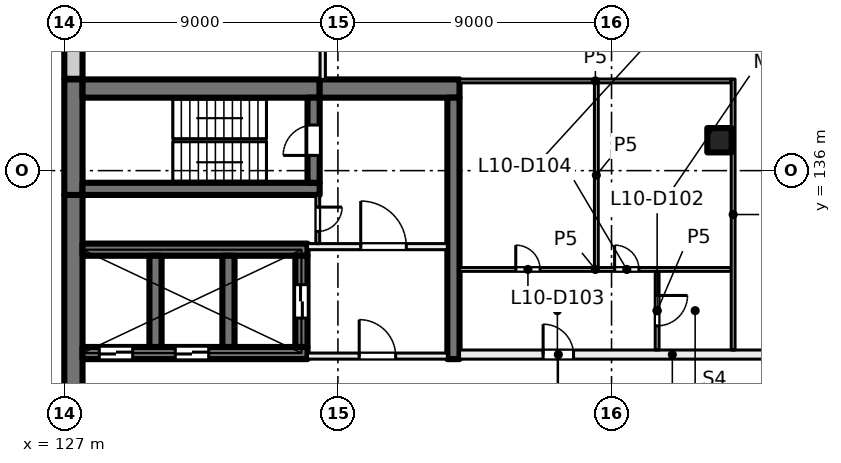
"""IFC4 building model, lengths in metres.
Left out: names, types, materials, properties, quantities, classifications, styles, units other than length and angle.
Written with IfcOpenShell. Run it as: python <this file> out.ifc"""

import sys

from ifc_helpers import new_model, si_unit, direction, frame, frame_2d, origin, origin_2d, place, context, subcontext, project, spatial, rectangle, extrude, element, fill, save


model = new_model("IFC4")
c1 = context("Model", 3, precision=1e-05, world=origin(), true_north=direction((0.0, 1.0)))
c2 = subcontext(c1, "Body", "Model", "MODEL_VIEW")
j1 = project(units=[si_unit("LENGTHUNIT", "METRE"), si_unit("PLANEANGLEUNIT", "RADIAN")], contexts=[c1])
p1 = place(None, origin())
s1 = spatial("IfcSite", under=j1, at=p1, CompositionType="ELEMENT")
p2 = place(p1, origin())
s2 = spatial("IfcBuilding", under=s1, at=p2, CompositionType="ELEMENT")
p3 = place(p2, frame((0.0, 0.0, 47.5)))
s3 = spatial("IfcBuildingStorey", under=s2, at=p3, CompositionType="ELEMENT", Elevation=47.5)
p4 = place(p3, frame((148.55, 137.0, 0.0), z_axis=(0.0, 0.0, 1.0), x_axis=(1.0, 0.0, 0.0)))
e1 = element("IfcColumn", 1, at=p4, inside=s3, PredefinedType="COLUMN", context=c2, shape_type="SweptSolid", body=[
    extrude(rectangle(XDim=0.8, YDim=0.8, at=origin_2d()), origin(), (0.0, 0.0, 1.0), 4.0),
])
p5 = place(p3, frame((127.3, 120.8, 0.0), z_axis=(0.0, 0.0, 1.0), x_axis=(0.0, 1.0, 0.0)))
e2 = element("IfcWall", 2, at=p5, inside=s3, PredefinedType="SHEAR", context=c2, shape_type="SweptSolid", body=[
    extrude(rectangle(XDim=14.4, YDim=0.6, at=frame_2d((7.2, 0.0))), origin(), (0.0, 0.0, 1.0), 4.0),
])
p6 = place(p3, frame((127.3, 135.2, 0.0), z_axis=(0.0, 0.0, 1.0), x_axis=(0.0, 1.0, 0.0)))
e3 = element("IfcWall", 3, at=p6, inside=s3, PredefinedType="SHEAR", context=c2, shape_type="SweptSolid", body=[
    extrude(rectangle(XDim=3.8, YDim=0.6, at=frame_2d((1.9, 0.0))), origin(), (0.0, 0.0, 1.0), 4.0),
])
p7 = place(p3, frame((127.6, 138.7, 0.0), z_axis=(0.0, 0.0, 1.0), x_axis=(1.0, 0.0, 0.0)))
e4 = element("IfcWall", 4, at=p7, inside=s3, PredefinedType="SHEAR", context=c2, shape_type="SweptSolid", body=[
    extrude(rectangle(XDim=7.8, YDim=0.6, at=frame_2d((3.9, 0.0))), origin(), (0.0, 0.0, 1.0), 4.0),
])
p8 = place(p3, frame((135.4, 138.7, 0.0), z_axis=(0.0, 0.0, 1.0), x_axis=(1.0, 0.0, 0.0)))
e5 = element("IfcWall", 5, at=p8, inside=s3, PredefinedType="SHEAR", context=c2, shape_type="SweptSolid", body=[
    extrude(rectangle(XDim=4.6, YDim=0.6, at=frame_2d((2.3, 0.0))), origin(), (0.0, 0.0, 1.0), 4.0),
])
p9 = place(p3, frame((127.6, 135.4, 0.0), z_axis=(0.0, 0.0, 1.0), x_axis=(1.0, 0.0, 0.0)))
e6 = element("IfcWall", 6, at=p9, inside=s3, PredefinedType="SHEAR", context=c2, shape_type="SweptSolid", body=[
    extrude(rectangle(XDim=7.8, YDim=0.4, at=frame_2d((3.9, 0.0))), origin(), (0.0, 0.0, 1.0), 4.0),
])
p10 = place(p3, frame((135.2, 135.6, 0.0), z_axis=(0.0, 0.0, 1.0), x_axis=(0.0, 1.0, 0.0)))
e7 = element("IfcWall", 7, at=p10, inside=s3, PredefinedType="SHEAR", context=c2, shape_type="SweptSolid", body=[
    extrude(rectangle(XDim=2.8, YDim=0.4, at=frame_2d((1.4, 0.0))), origin(), (0.0, 0.0, 1.0), 4.0),
])
p11 = place(p10, frame((0.9, 0.0, 0.0)))
e8 = element("IfcOpeningElement", 8, at=p11, cuts=e7, PredefinedType="OPENING", context=c2, shape_type="SweptSolid", body=[
    extrude(rectangle(XDim=1.0, YDim=2.1, at=frame_2d((0.5, 1.05))), frame((0.0, 0.21, 0.0), z_axis=(0.0, -1.0, 0.0), x_axis=(1.0, 0.0, 0.0)), (0.0, 0.0, 1.0), 0.42),
])
p12 = place(p3, frame((127.6, 130.0, 0.0), z_axis=(0.0, 0.0, 1.0), x_axis=(1.0, 0.0, 0.0)))
e9 = element("IfcWall", 9, at=p12, inside=s3, PredefinedType="SHEAR", context=c2, shape_type="SweptSolid", body=[
    extrude(rectangle(XDim=7.4, YDim=0.4, at=frame_2d((3.7, 0.0))), origin(), (0.0, 0.0, 1.0), 4.0),
])
p13 = place(p12, frame((0.55, 0.0, 0.0)))
e10 = element("IfcOpeningElement", 10, at=p13, cuts=e9, PredefinedType="OPENING", context=c2, shape_type="SweptSolid", body=[
    extrude(rectangle(XDim=1.1, YDim=2.1, at=frame_2d((0.55, 1.05))), frame((0.0, 0.21, 0.0), z_axis=(0.0, -1.0, 0.0), x_axis=(1.0, 0.0, 0.0)), (0.0, 0.0, 1.0), 0.42),
])
p14 = place(p12, frame((3.05, 0.0, 0.0)))
e11 = element("IfcOpeningElement", 11, at=p14, cuts=e9, PredefinedType="OPENING", context=c2, shape_type="SweptSolid", body=[
    extrude(rectangle(XDim=1.1, YDim=2.1, at=frame_2d((0.55, 1.05))), frame((0.0, 0.21, 0.0), z_axis=(0.0, -1.0, 0.0), x_axis=(1.0, 0.0, 0.0)), (0.0, 0.0, 1.0), 0.42),
])
p15 = place(p3, frame((127.6, 133.4, 0.0), z_axis=(0.0, 0.0, 1.0), x_axis=(1.0, 0.0, 0.0)))
e12 = element("IfcWall", 12, at=p15, inside=s3, PredefinedType="SHEAR", context=c2, shape_type="SweptSolid", body=[
    extrude(rectangle(XDim=7.4, YDim=0.4, at=frame_2d((3.7, 0.0))), origin(), (0.0, 0.0, 1.0), 4.0),
])
for number, where, z_axis, x_axis in (
    (13, (130.0, 130.2, 0.0), (0.0, 0.0, 1.0), (0.0, 1.0, 0.0)),
    (14, (132.4, 130.2, 0.0), (0.0, 0.0, 1.0), (0.0, 1.0, 0.0)),
):
    element("IfcWall", number, at=place(p3, frame(where, z_axis=z_axis, x_axis=x_axis)), inside=s3, PredefinedType="SHEAR", context=c2, shape_type="SweptSolid", body=[
        extrude(rectangle(XDim=3.0, YDim=0.4, at=frame_2d((1.5, 0.0))), origin(), (0.0, 0.0, 1.0), 4.0),
    ])
p16 = place(p3, frame((134.8, 130.2, 0.0), z_axis=(0.0, 0.0, 1.0), x_axis=(0.0, 1.0, 0.0)))
e15 = element("IfcWall", 15, at=p16, inside=s3, PredefinedType="SHEAR", context=c2, shape_type="SweptSolid", body=[
    extrude(rectangle(XDim=3.0, YDim=0.4, at=frame_2d((1.5, 0.0))), origin(), (0.0, 0.0, 1.0), 4.0),
])
p17 = place(p16, frame((0.95, 0.0, 0.0)))
e16 = element("IfcOpeningElement", 16, at=p17, cuts=e15, PredefinedType="OPENING", context=c2, shape_type="SweptSolid", body=[
    extrude(rectangle(XDim=1.1, YDim=2.1, at=frame_2d((0.55, 1.05))), frame((0.0, 0.21, 0.0), z_axis=(0.0, -1.0, 0.0), x_axis=(1.0, 0.0, 0.0)), (0.0, 0.0, 1.0), 0.42),
])
p18 = place(p3, frame((139.8, 129.8, 0.0), z_axis=(0.0, 0.0, 1.0), x_axis=(0.0, 1.0, 0.0)))
e17 = element("IfcWall", 17, at=p18, inside=s3, PredefinedType="SHEAR", context=c2, shape_type="SweptSolid", body=[
    extrude(rectangle(XDim=8.6, YDim=0.4, at=frame_2d((4.3, 0.0))), origin(), (0.0, 0.0, 1.0), 4.0),
])
p19 = place(p3, frame((127.3, 139.02, 0.0), z_axis=(0.0, 0.0, 1.0), x_axis=(0.0, 1.0, 0.0)))
e18 = element("IfcWall", 18, at=p19, inside=s3, PredefinedType="SOLIDWALL", context=c2, shape_type="SweptSolid", body=[
    extrude(rectangle(XDim=2.98, YDim=0.6, at=frame_2d((1.49, 0.0))), origin(), (0.0, 0.0, 1.0), 3.625),
])
p20 = place(p3, frame((135.0, 129.9, 0.0), z_axis=(0.0, 0.0, 1.0), x_axis=(1.0, 0.0, 0.0)))
e19 = element("IfcWall", 19, at=p20, inside=s3, PredefinedType="PARTITIONING", context=c2, shape_type="SweptSolid", body=[
    extrude(rectangle(XDim=4.6, YDim=0.2, at=frame_2d((2.3, 0.0))), origin(), (0.0, 0.0, 1.0), 3.625),
])
p21 = place(p20, frame((1.7, 0.0, 0.0)))
e20 = element("IfcOpeningElement", 20, at=p21, cuts=e19, PredefinedType="OPENING", context=c2, shape_type="SweptSolid", body=[
    extrude(rectangle(XDim=1.2, YDim=2.1, at=frame_2d((0.6, 1.05))), frame((0.0, 0.11, 0.0), z_axis=(0.0, -1.0, 0.0), x_axis=(1.0, 0.0, 0.0)), (0.0, 0.0, 1.0), 0.22),
])
p22 = place(p3, frame((135.0, 133.5, 0.0), z_axis=(0.0, 0.0, 1.0), x_axis=(1.0, 0.0, 0.0)))
e21 = element("IfcWall", 21, at=p22, inside=s3, PredefinedType="PARTITIONING", context=c2, shape_type="SweptSolid", body=[
    extrude(rectangle(XDim=4.6, YDim=0.2, at=frame_2d((2.3, 0.0))), origin(), (0.0, 0.0, 1.0), 3.625),
])
p23 = place(p22, frame((1.75, 0.0, 0.0)))
e22 = element("IfcOpeningElement", 22, at=p23, cuts=e21, PredefinedType="OPENING", context=c2, shape_type="SweptSolid", body=[
    extrude(rectangle(XDim=1.5, YDim=2.1, at=frame_2d((0.75, 1.05))), frame((0.0, 0.11, 0.0), z_axis=(0.0, -1.0, 0.0), x_axis=(1.0, 0.0, 0.0)), (0.0, 0.0, 1.0), 0.22),
])
p24 = place(p3, frame((135.337, 135.2, 0.0), z_axis=(0.0, 0.0, 1.0), x_axis=(0.0, -1.0, 0.0)))
e23 = element("IfcWall", 23, at=p24, inside=s3, PredefinedType="PARTITIONING", context=c2, shape_type="SweptSolid", body=[
    extrude(rectangle(XDim=1.6, YDim=0.125, at=frame_2d((0.8, 0.0))), origin(), (0.0, 0.0, 1.0), 3.625),
])
p25 = place(p24, frame((0.4, 0.0, 0.0)))
e24 = element("IfcOpeningElement", 24, at=p25, cuts=e23, PredefinedType="OPENING", context=c2, shape_type="SweptSolid", body=[
    extrude(rectangle(XDim=0.8, YDim=2.1, at=frame_2d((0.4, 1.05))), frame((0.0, 0.073, 0.0), z_axis=(0.0, -1.0, 0.0), x_axis=(1.0, 0.0, 0.0)), (0.0, 0.0, 1.0), 0.145),
])
p26 = place(p3, frame((135.5, 145.4, 0.0), z_axis=(0.0, 0.0, 1.0), x_axis=(0.0, -1.0, 0.0)))
e25 = element("IfcWall", 25, at=p26, inside=s3, PredefinedType="PARTITIONING", context=c2, shape_type="SweptSolid", body=[
    extrude(rectangle(XDim=6.4, YDim=0.175, at=frame_2d((3.2, 0.0))), origin(), (0.0, 0.0, 1.0), 3.625),
])
p27 = place(p26, frame((2.6, 0.0, 0.0)))
e26 = element("IfcOpeningElement", 26, at=p27, cuts=e25, PredefinedType="OPENING", context=c2, shape_type="SweptSolid", body=[
    extrude(rectangle(XDim=1.2, YDim=2.1, at=frame_2d((0.6, 1.05))), frame((0.0, 0.097, 0.0), z_axis=(0.0, -1.0, 0.0), x_axis=(1.0, 0.0, 0.0)), (0.0, 0.0, 1.0), 0.195),
])
p28 = place(p3, frame((140.0, 129.95, 0.0), z_axis=(0.0, 0.0, 1.0), x_axis=(1.0, 0.0, 0.0)))
e27 = element("IfcWall", 27, at=p28, inside=s3, PredefinedType="PARTITIONING", context=c2, shape_type="SweptSolid", body=[
    extrude(rectangle(XDim=14.0, YDim=0.3, at=frame_2d((7.0, 0.0))), origin(), (0.0, 0.0, 1.0), 3.625),
])
p29 = place(p28, frame((2.75, 0.0, 0.0)))
e28 = element("IfcOpeningElement", 28, at=p29, cuts=e27, PredefinedType="OPENING", context=c2, shape_type="SweptSolid", body=[
    extrude(rectangle(XDim=1.0, YDim=2.1, at=frame_2d((0.5, 1.05))), frame((0.0, 0.16, 0.0), z_axis=(0.0, -1.0, 0.0), x_axis=(1.0, 0.0, 0.0)), (0.0, 0.0, 1.0), 0.32),
])
p30 = place(p28, frame((10.6, 0.0, 0.0)))
e29 = element("IfcOpeningElement", 29, at=p30, cuts=e27, PredefinedType="OPENING", context=c2, shape_type="SweptSolid", body=[
    extrude(rectangle(XDim=1.8, YDim=2.1, at=frame_2d((0.9, 1.05))), frame((0.0, 0.16, 0.0), z_axis=(0.0, -1.0, 0.0), x_axis=(1.0, 0.0, 0.0)), (0.0, 0.0, 1.0), 0.32),
])
p31 = place(p3, frame((140.0, 132.75, 0.0), z_axis=(0.0, 0.0, 1.0), x_axis=(1.0, 0.0, 0.0)))
e30 = element("IfcWall", 30, at=p31, inside=s3, PredefinedType="PARTITIONING", context=c2, shape_type="SweptSolid", body=[
    extrude(rectangle(XDim=8.938, YDim=0.125, at=frame_2d((4.469, 0.0))), origin(), (0.0, 0.0, 1.0), 3.625),
])
p32 = place(p31, frame((1.85, 0.0, 0.0)))
e31 = element("IfcOpeningElement", 31, at=p32, cuts=e30, PredefinedType="OPENING", context=c2, shape_type="SweptSolid", body=[
    extrude(rectangle(XDim=0.8, YDim=2.1, at=frame_2d((0.4, 1.05))), frame((0.0, 0.073, 0.0), z_axis=(0.0, -1.0, 0.0), x_axis=(1.0, 0.0, 0.0)), (0.0, 0.0, 1.0), 0.145),
])
p33 = place(p31, frame((5.102, 0.0, 0.0)))
e32 = element("IfcOpeningElement", 32, at=p33, cuts=e30, PredefinedType="OPENING", context=c2, shape_type="SweptSolid", body=[
    extrude(rectangle(XDim=0.8, YDim=2.1, at=frame_2d((0.4, 1.05))), frame((0.0, 0.073, 0.0), z_axis=(0.0, -1.0, 0.0), x_axis=(1.0, 0.0, 0.0)), (0.0, 0.0, 1.0), 0.145),
])
p34 = place(p3, frame((140.0, 138.95, 0.0), z_axis=(0.0, 0.0, 1.0), x_axis=(1.0, 0.0, 0.0)))
e33 = element("IfcWall", 33, at=p34, inside=s3, PredefinedType="PARTITIONING", context=c2, shape_type="SweptSolid", body=[
    extrude(rectangle(XDim=8.938, YDim=0.125, at=frame_2d((4.469, 0.0))), origin(), (0.0, 0.0, 1.0), 3.625),
])
p35 = place(p3, frame((144.5, 132.812, 0.0), z_axis=(0.0, 0.0, 1.0), x_axis=(0.0, 1.0, 0.0)))
e34 = element("IfcWall", 34, at=p35, inside=s3, PredefinedType="PARTITIONING", context=c2, shape_type="SweptSolid", body=[
    extrude(rectangle(XDim=6.076, YDim=0.125, at=frame_2d((3.038, 0.0))), origin(), (0.0, 0.0, 1.0), 3.625),
])
p36 = place(p3, frame((146.5, 132.688, 0.0), z_axis=(0.0, 0.0, 1.0), x_axis=(0.0, -1.0, 0.0)))
e35 = element("IfcWall", 35, at=p36, inside=s3, PredefinedType="PARTITIONING", context=c2, shape_type="SweptSolid", body=[
    extrude(rectangle(XDim=2.588, YDim=0.125, at=frame_2d((1.294, 0.0))), origin(), (0.0, 0.0, 1.0), 3.625),
])
p37 = place(p36, frame((0.794, 0.0, 0.0)))
e36 = element("IfcOpeningElement", 36, at=p37, cuts=e35, PredefinedType="OPENING", context=c2, shape_type="SweptSolid", body=[
    extrude(rectangle(XDim=1.0, YDim=2.1, at=frame_2d((0.5, 1.05))), frame((0.0, 0.073, 0.0), z_axis=(0.0, -1.0, 0.0), x_axis=(1.0, 0.0, 0.0)), (0.0, 0.0, 1.0), 0.145),
])
p38 = place(p3, frame((149.0, 139.012, 0.0), z_axis=(0.0, 0.0, 1.0), x_axis=(0.0, -1.0, 0.0)))
e37 = element("IfcWall", 37, at=p38, inside=s3, PredefinedType="PARTITIONING", context=c2, shape_type="SweptSolid", body=[
    extrude(rectangle(XDim=8.912, YDim=0.125, at=frame_2d((4.456, 0.0))), origin(), (0.0, 0.0, 1.0), 3.625),
])
p39 = place(p13, origin())
e38 = element("IfcDoor", 38, at=p39, inside=s3, OperationType="DOUBLE_DOOR_SLIDING", PredefinedType="DOOR", context=c2, shape_type="SweptSolid", body=[
    extrude(rectangle(XDim=1.1, YDim=2.1, at=frame_2d((0.55, 1.05))), frame((0.0, 0.025, 0.0), z_axis=(0.0, -1.0, 0.0), x_axis=(1.0, 0.0, 0.0)), (0.0, 0.0, 1.0), 0.05),
])
fill(e10, e38)
p40 = place(p14, origin())
e39 = element("IfcDoor", 39, at=p40, inside=s3, OperationType="DOUBLE_DOOR_SLIDING", PredefinedType="DOOR", context=c2, shape_type="SweptSolid", body=[
    extrude(rectangle(XDim=1.1, YDim=2.1, at=frame_2d((0.55, 1.05))), frame((0.0, 0.025, 0.0), z_axis=(0.0, -1.0, 0.0), x_axis=(1.0, 0.0, 0.0)), (0.0, 0.0, 1.0), 0.05),
])
fill(e11, e39)
p41 = place(p21, origin())
e40 = element("IfcDoor", 40, at=p41, inside=s3, OperationType="DOUBLE_DOOR_SINGLE_SWING", PredefinedType="DOOR", context=c2, shape_type="SweptSolid", body=[
    extrude(rectangle(XDim=1.2, YDim=2.1, at=frame_2d((0.6, 1.05))), frame((0.0, 0.025, 0.0), z_axis=(0.0, -1.0, 0.0), x_axis=(1.0, 0.0, 0.0)), (0.0, 0.0, 1.0), 0.05),
])
fill(e20, e40)
p42 = place(p23, origin())
e41 = element("IfcDoor", 41, at=p42, inside=s3, OperationType="DOUBLE_DOOR_SINGLE_SWING", PredefinedType="DOOR", context=c2, shape_type="SweptSolid", body=[
    extrude(rectangle(XDim=1.5, YDim=2.1, at=frame_2d((0.75, 1.05))), frame((0.0, 0.025, 0.0), z_axis=(0.0, -1.0, 0.0), x_axis=(1.0, 0.0, 0.0)), (0.0, 0.0, 1.0), 0.05),
])
fill(e22, e41)
p43 = place(p11, origin())
e42 = element("IfcDoor", 42, at=p43, inside=s3, OperationType="SINGLE_SWING_LEFT", PredefinedType="DOOR", context=c2, shape_type="SweptSolid", body=[
    extrude(rectangle(XDim=1.0, YDim=2.1, at=frame_2d((0.5, 1.05))), frame((0.0, 0.025, 0.0), z_axis=(0.0, -1.0, 0.0), x_axis=(1.0, 0.0, 0.0)), (0.0, 0.0, 1.0), 0.05),
])
fill(e8, e42)
p44 = place(p25, origin())
e43 = element("IfcDoor", 43, at=p44, inside=s3, OperationType="SINGLE_SWING_RIGHT", PredefinedType="DOOR", context=c2, shape_type="SweptSolid", body=[
    extrude(rectangle(XDim=0.8, YDim=2.1, at=frame_2d((0.4, 1.05))), frame((0.0, 0.025, 0.0), z_axis=(0.0, -1.0, 0.0), x_axis=(1.0, 0.0, 0.0)), (0.0, 0.0, 1.0), 0.05),
])
fill(e24, e43)
p45 = place(p17, origin())
e44 = element("IfcDoor", 44, at=p45, inside=s3, OperationType="DOUBLE_DOOR_SLIDING", PredefinedType="DOOR", context=c2, shape_type="SweptSolid", body=[
    extrude(rectangle(XDim=1.1, YDim=2.1, at=frame_2d((0.55, 1.05))), frame((0.0, 0.025, 0.0), z_axis=(0.0, -1.0, 0.0), x_axis=(1.0, 0.0, 0.0)), (0.0, 0.0, 1.0), 0.05),
])
fill(e16, e44)
p46 = place(p29, origin())
e45 = element("IfcDoor", 45, at=p46, inside=s3, OperationType="SINGLE_SWING_LEFT", PredefinedType="DOOR", context=c2, shape_type="SweptSolid", body=[
    extrude(rectangle(XDim=1.0, YDim=2.1, at=frame_2d((0.5, 1.05))), frame((0.0, 0.025, 0.0), z_axis=(0.0, -1.0, 0.0), x_axis=(1.0, 0.0, 0.0)), (0.0, 0.0, 1.0), 0.05),
])
fill(e28, e45)
p47 = place(p37, origin())
e46 = element("IfcDoor", 46, at=p47, inside=s3, OperationType="SINGLE_SWING_RIGHT", PredefinedType="DOOR", context=c2, shape_type="SweptSolid", body=[
    extrude(rectangle(XDim=1.0, YDim=2.1, at=frame_2d((0.5, 1.05))), frame((0.0, 0.025, 0.0), z_axis=(0.0, -1.0, 0.0), x_axis=(1.0, 0.0, 0.0)), (0.0, 0.0, 1.0), 0.05),
])
fill(e36, e46)
p48 = place(p32, origin())
e47 = element("IfcDoor", 47, at=p48, inside=s3, OperationType="SINGLE_SWING_LEFT", PredefinedType="DOOR", context=c2, shape_type="SweptSolid", body=[
    extrude(rectangle(XDim=0.8, YDim=2.1, at=frame_2d((0.4, 1.05))), frame((0.0, 0.025, 0.0), z_axis=(0.0, -1.0, 0.0), x_axis=(1.0, 0.0, 0.0)), (0.0, 0.0, 1.0), 0.05),
])
fill(e31, e47)
p49 = place(p33, origin())
e48 = element("IfcDoor", 48, at=p49, inside=s3, OperationType="SINGLE_SWING_LEFT", PredefinedType="DOOR", context=c2, shape_type="SweptSolid", body=[
    extrude(rectangle(XDim=0.8, YDim=2.1, at=frame_2d((0.4, 1.05))), frame((0.0, 0.025, 0.0), z_axis=(0.0, -1.0, 0.0), x_axis=(1.0, 0.0, 0.0)), (0.0, 0.0, 1.0), 0.05),
])
fill(e32, e48)
save(model, sys.argv[1])
